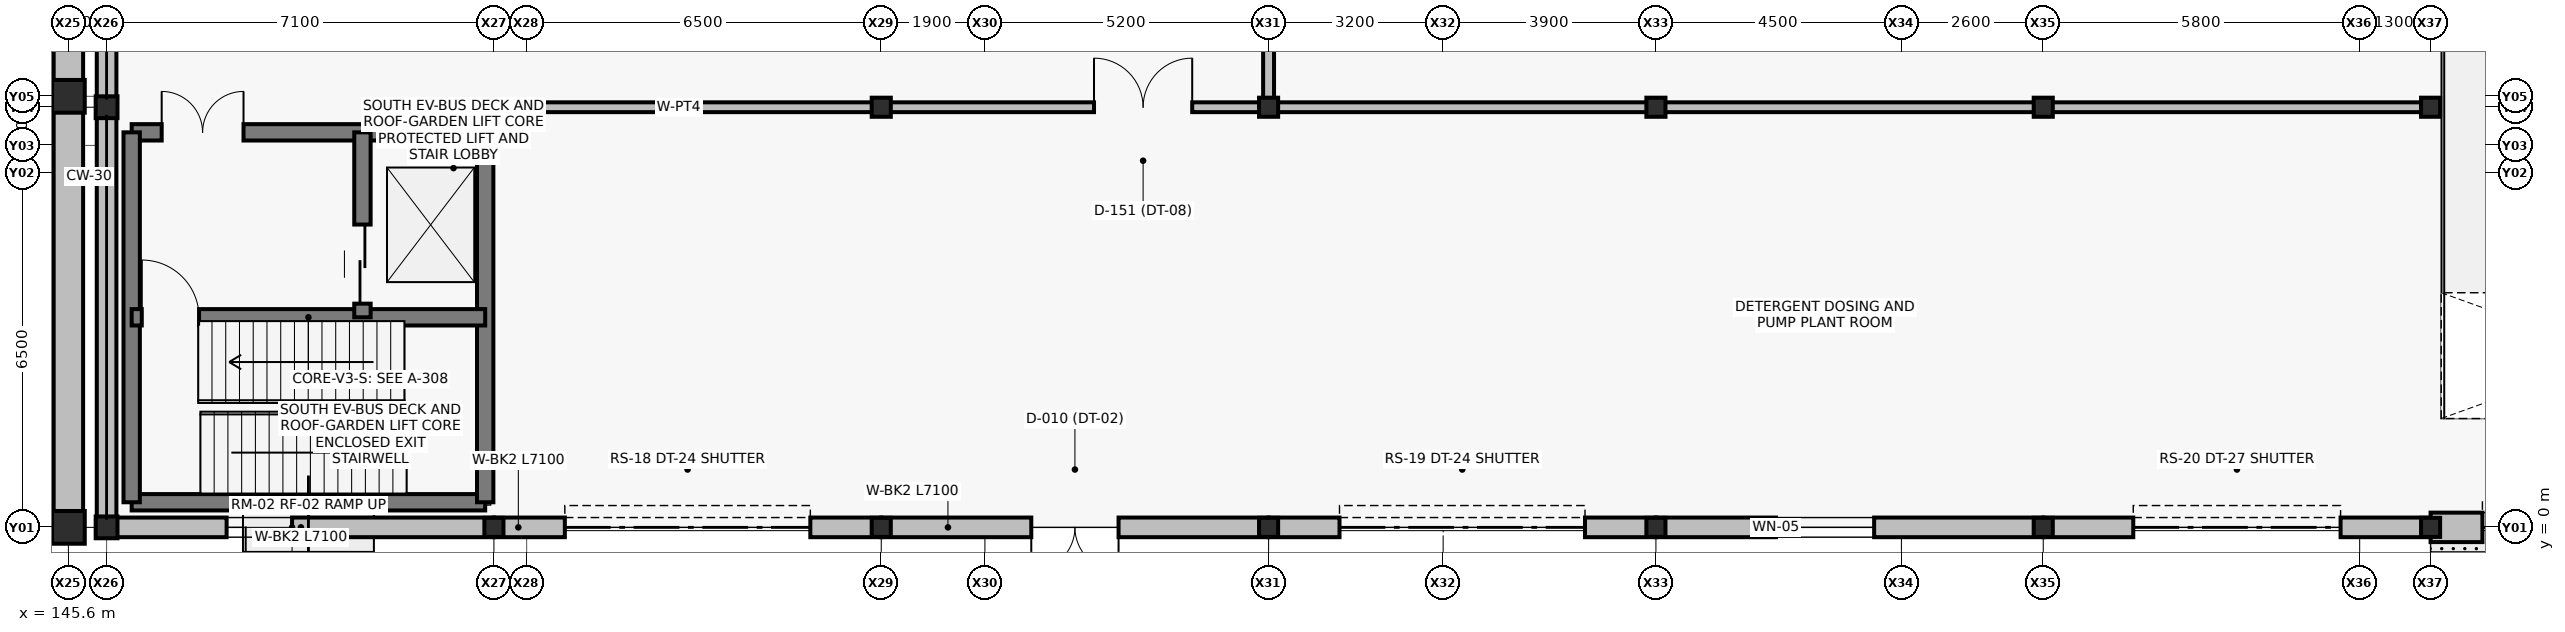
"""IFC4 building model, lengths in metres.
Left out: names, types, materials, properties, quantities, classifications, styles, units other than length and angle.
Written with IfcOpenShell. Run it as: python <this file> out.ifc"""

import sys

from ifc_helpers import new_model, si_unit, direction, frame, frame_2d, origin, origin_2d, place, context, subcontext, project, spatial, rectangle, hollow_rectangle, i_section, extrude, element, fill, save


model = new_model("IFC4")
c1 = context("Model", 3, precision=1e-05, world=origin(), true_north=direction((0.0, 1.0)))
c2 = subcontext(c1, "Body", "Model", "MODEL_VIEW")
j1 = project(units=[si_unit("LENGTHUNIT", "METRE"), si_unit("PLANEANGLEUNIT", "RADIAN")], contexts=[c1])
p1 = place(None, origin())
s1 = spatial("IfcSite", under=j1, at=p1, CompositionType="ELEMENT")
p2 = place(p1, origin())
s2 = spatial("IfcBuilding", under=s1, at=p2, CompositionType="ELEMENT")
p3 = place(p2, origin())
s3 = spatial("IfcBuildingStorey", under=s2, at=p3, CompositionType="ELEMENT", Elevation=0.0)
p4 = place(p3, frame((146.3, 0.0, -0.35), z_axis=(0.0, 0.0, 1.0), x_axis=(1.0, 0.0, 0.0)))
e1 = element("IfcColumn", 1, at=p4, inside=s3, PredefinedType="COLUMN", context=c2, shape_type="SweptSolid", body=[
    extrude(hollow_rectangle(XDim=0.4, YDim=0.4, WallThickness=0.016, at=origin_2d()), origin(), (0.0, 0.0, 1.0), 6.35),
])
p5 = place(p3, frame((146.3, 7.7, -0.35), z_axis=(0.0, 0.0, 1.0), x_axis=(1.0, 0.0, 0.0)))
e2 = element("IfcColumn", 2, at=p5, inside=s3, PredefinedType="COLUMN", context=c2, shape_type="SweptSolid", body=[
    extrude(i_section(OverallWidth=0.4, OverallDepth=0.4, WebThickness=0.013, FlangeThickness=0.021, at=origin_2d()), origin(), (0.0, 0.0, 1.0), 6.35),
])
for number, where, z_axis, x_axis in (
    (3, (153.4, 0.0, -0.35), (0.0, 0.0, 1.0), (1.0, 0.0, 0.0)),
    (4, (160.5, 0.0, -0.35), (0.0, 0.0, 1.0), (1.0, 0.0, 0.0)),
    (5, (160.5, 7.7, -0.35), (0.0, 0.0, 1.0), (1.0, 0.0, 0.0)),
    (6, (167.6, 0.0, -0.35), (0.0, 0.0, 1.0), (1.0, 0.0, 0.0)),
    (7, (167.6, 7.7, -0.35), (0.0, 0.0, 1.0), (1.0, 0.0, 0.0)),
    (8, (174.7, 0.0, -0.35), (0.0, 0.0, 1.0), (1.0, 0.0, 0.0)),
    (9, (174.7, 7.7, -0.35), (0.0, 0.0, 1.0), (1.0, 0.0, 0.0)),
    (10, (181.8, 0.0, -0.35), (0.0, 0.0, 1.0), (1.0, 0.0, 0.0)),
    (11, (181.8, 7.7, -0.35), (0.0, 0.0, 1.0), (1.0, 0.0, 0.0)),
    (12, (188.9, 0.0, -0.35), (0.0, 0.0, 1.0), (1.0, 0.0, 0.0)),
    (13, (188.9, 7.7, -0.35), (0.0, 0.0, 1.0), (1.0, 0.0, 0.0)),
):
    element("IfcColumn", number, at=place(p3, frame(where, z_axis=z_axis, x_axis=x_axis)), inside=s3, PredefinedType="COLUMN", context=c2, shape_type="SweptSolid", body=[
        extrude(i_section(OverallWidth=0.35, OverallDepth=0.35, WebThickness=0.012, FlangeThickness=0.019, at=origin_2d()), origin(), (0.0, 0.0, 1.0), 6.35),
    ])
for number, where, z_axis, x_axis in (
    (14, (145.6, 0.0, -0.35), (0.0, 0.0, 1.0), (1.0, 0.0, 0.0)),
    (15, (145.6, 7.9, -0.35), (0.0, 0.0, 1.0), (1.0, 0.0, 0.0)),
):
    element("IfcColumn", number, at=place(p3, frame(where, z_axis=z_axis, x_axis=x_axis)), inside=s3, PredefinedType="COLUMN", context=c2, shape_type="SweptSolid", body=[
        extrude(rectangle(XDim=0.6, YDim=0.6, at=origin_2d()), origin(), (0.0, 0.0, 1.0), 6.35),
    ])
p6 = place(p3, frame((188.9, 0.0, 0.0), z_axis=(0.0, 0.0, 1.0), x_axis=(1.0, 0.0, 0.0)))
e16 = element("IfcWall", 16, at=p6, inside=s3, PredefinedType="SOLIDWALL", context=c2, shape_type="SweptSolid", body=[
    extrude(rectangle(XDim=7.1, YDim=0.54, at=frame_2d((3.55, 0.0))), origin(), (0.0, 0.0, 1.0), 4.82),
])
p7 = place(p6, frame((0.95, 0.0, 0.0)))
e17 = element("IfcOpeningElement", 17, at=p7, cuts=e16, PredefinedType="OPENING", context=c2, shape_type="SweptSolid", body=[
    extrude(rectangle(XDim=5.2, YDim=4.45, at=frame_2d((2.6, 2.225))), frame((0.0, 0.28, 0.0), z_axis=(0.0, -1.0, 0.0), x_axis=(1.0, 0.0, 0.0)), (0.0, 0.0, 1.0), 0.56),
])
p8 = place(p3, frame((146.3, 0.0, 0.0), z_axis=(0.0, 0.0, 1.0), x_axis=(1.0, 0.0, 0.0)))
e18 = element("IfcWall", 18, at=p8, inside=s3, PredefinedType="SOLIDWALL", context=c2, shape_type="SweptSolid", body=[
    extrude(rectangle(XDim=7.1, YDim=0.36, at=frame_2d((3.55, 0.0))), origin(), (0.0, 0.0, 1.0), 4.82),
])
p9 = place(p8, frame((2.2, 0.0, 1.0)))
e19 = element("IfcOpeningElement", 19, at=p9, cuts=e18, PredefinedType="OPENING", context=c2, shape_type="SweptSolid", body=[
    extrude(rectangle(XDim=1.2, YDim=1.5, at=frame_2d((0.6, 0.75))), frame((0.0, 0.19, 0.0), z_axis=(0.0, -1.0, 0.0), x_axis=(1.0, 0.0, 0.0)), (0.0, 0.0, 1.0), 0.38),
])
p10 = place(p3, frame((153.4, 0.0, 0.0), z_axis=(0.0, 0.0, 1.0), x_axis=(1.0, 0.0, 0.0)))
e20 = element("IfcWall", 20, at=p10, inside=s3, PredefinedType="SOLIDWALL", context=c2, shape_type="SweptSolid", body=[
    extrude(rectangle(XDim=7.1, YDim=0.36, at=frame_2d((3.55, 0.0))), origin(), (0.0, 0.0, 1.0), 4.82),
])
p11 = place(p10, frame((1.3, 0.0, 0.0)))
e21 = element("IfcOpeningElement", 21, at=p11, cuts=e20, PredefinedType="OPENING", context=c2, shape_type="SweptSolid", body=[
    extrude(rectangle(XDim=4.5, YDim=4.45, at=frame_2d((2.25, 2.225))), frame((0.0, 0.19, 0.0), z_axis=(0.0, -1.0, 0.0), x_axis=(1.0, 0.0, 0.0)), (0.0, 0.0, 1.0), 0.38),
])
p12 = place(p3, frame((160.5, 0.0, 0.0), z_axis=(0.0, 0.0, 1.0), x_axis=(1.0, 0.0, 0.0)))
e22 = element("IfcWall", 22, at=p12, inside=s3, PredefinedType="SOLIDWALL", context=c2, shape_type="SweptSolid", body=[
    extrude(rectangle(XDim=7.1, YDim=0.36, at=frame_2d((3.55, 0.0))), origin(), (0.0, 0.0, 1.0), 4.82),
])
p13 = place(p12, frame((2.75, 0.0, 0.0)))
e23 = element("IfcOpeningElement", 23, at=p13, cuts=e22, PredefinedType="OPENING", context=c2, shape_type="SweptSolid", body=[
    extrude(rectangle(XDim=1.6, YDim=2.3, at=frame_2d((0.8, 1.15))), frame((0.0, 0.19, 0.0), z_axis=(0.0, -1.0, 0.0), x_axis=(1.0, 0.0, 0.0)), (0.0, 0.0, 1.0), 0.38),
])
p14 = place(p3, frame((167.6, 0.0, 0.0), z_axis=(0.0, 0.0, 1.0), x_axis=(1.0, 0.0, 0.0)))
e24 = element("IfcWall", 24, at=p14, inside=s3, PredefinedType="SOLIDWALL", context=c2, shape_type="SweptSolid", body=[
    extrude(rectangle(XDim=7.1, YDim=0.36, at=frame_2d((3.55, 0.0))), origin(), (0.0, 0.0, 1.0), 4.82),
])
p15 = place(p14, frame((1.3, 0.0, 0.0)))
e25 = element("IfcOpeningElement", 25, at=p15, cuts=e24, PredefinedType="OPENING", context=c2, shape_type="SweptSolid", body=[
    extrude(rectangle(XDim=4.5, YDim=4.45, at=frame_2d((2.25, 2.225))), frame((0.0, 0.19, 0.0), z_axis=(0.0, -1.0, 0.0), x_axis=(1.0, 0.0, 0.0)), (0.0, 0.0, 1.0), 0.38),
])
p16 = place(p3, frame((174.7, 0.0, 0.0), z_axis=(0.0, 0.0, 1.0), x_axis=(1.0, 0.0, 0.0)))
e26 = element("IfcWall", 26, at=p16, inside=s3, PredefinedType="SOLIDWALL", context=c2, shape_type="SweptSolid", body=[
    extrude(rectangle(XDim=7.1, YDim=0.36, at=frame_2d((3.55, 0.0))), origin(), (0.0, 0.0, 1.0), 4.82),
])
p17 = place(p16, frame((2.2, 0.0, 1.0)))
e27 = element("IfcOpeningElement", 27, at=p17, cuts=e26, PredefinedType="OPENING", context=c2, shape_type="SweptSolid", body=[
    extrude(rectangle(XDim=1.8, YDim=1.8, at=frame_2d((0.9, 0.9))), frame((0.0, 0.19, 0.0), z_axis=(0.0, -1.0, 0.0), x_axis=(1.0, 0.0, 0.0)), (0.0, 0.0, 1.0), 0.38),
])
p18 = place(p3, frame((181.8, 0.0, 0.0), z_axis=(0.0, 0.0, 1.0), x_axis=(1.0, 0.0, 0.0)))
e28 = element("IfcWall", 28, at=p18, inside=s3, PredefinedType="SOLIDWALL", context=c2, shape_type="SweptSolid", body=[
    extrude(rectangle(XDim=7.1, YDim=0.36, at=frame_2d((3.55, 0.0))), origin(), (0.0, 0.0, 1.0), 4.82),
])
p19 = place(p18, frame((1.65, 0.0, 0.0)))
e29 = element("IfcOpeningElement", 29, at=p19, cuts=e28, PredefinedType="OPENING", context=c2, shape_type="SweptSolid", body=[
    extrude(rectangle(XDim=3.8, YDim=4.4, at=frame_2d((1.9, 2.2))), frame((0.0, 0.19, 0.0), z_axis=(0.0, -1.0, 0.0), x_axis=(1.0, 0.0, 0.0)), (0.0, 0.0, 1.0), 0.38),
])
p20 = place(p3, frame((138.6, 0.0, 0.0), z_axis=(0.0, 0.0, 1.0), x_axis=(1.0, 0.0, 0.0)))
e30 = element("IfcWall", 30, at=p20, inside=s3, PredefinedType="SOLIDWALL", context=c2, shape_type="SweptSolid", body=[
    extrude(rectangle(XDim=7.0, YDim=0.54, at=frame_2d((3.5, 0.0))), origin(), (0.0, 0.0, 1.0), 5.25),
])
p21 = place(p20, frame((1.6, 0.0, 0.0)))
e31 = element("IfcOpeningElement", 31, at=p21, cuts=e30, PredefinedType="OPENING", context=c2, shape_type="SweptSolid", body=[
    extrude(rectangle(XDim=3.8, YDim=4.4, at=frame_2d((1.9, 2.2))), frame((0.0, 0.28, 0.0), z_axis=(0.0, -1.0, 0.0), x_axis=(1.0, 0.0, 0.0)), (0.0, 0.0, 1.0), 0.56),
])
for number, where, z_axis, x_axis in (
    (32, (145.6, 0.0, 0.0), (0.0, 0.0, 1.0), (0.0, 1.0, 0.0)),
    (33, (145.6, 7.9, 0.0), (0.0, 0.0, 1.0), (0.0, 1.0, 0.0)),
):
    element("IfcWall", number, at=place(p3, frame(where, z_axis=z_axis, x_axis=x_axis)), inside=s3, PredefinedType="SOLIDWALL", context=c2, shape_type="SweptSolid", body=[
        extrude(rectangle(XDim=7.9, YDim=0.54, at=frame_2d((3.95, 0.0))), origin(), (0.0, 0.0, 1.0), 5.25),
    ])
for number, where, z_axis, x_axis in (
    (34, (146.3, 0.0, 0.0), (0.0, 0.0, 1.0), (0.0, 1.0, 0.0)),
    (35, (146.3, 7.7, 0.0), (0.0, 0.0, 1.0), (0.0, 1.0, 0.0)),
):
    element("IfcWall", number, at=place(p3, frame(where, z_axis=z_axis, x_axis=x_axis)), inside=s3, PredefinedType="SOLIDWALL", context=c2, shape_type="SweptSolid", body=[
        extrude(rectangle(XDim=7.7, YDim=0.36, at=frame_2d((3.85, 0.0))), origin(), (0.0, 0.0, 1.0), 2.2),
    ])
p22 = place(p3, frame((146.76, 0.46, -0.35), z_axis=(0.0, 0.0, 1.0), x_axis=(1.0, 0.0, 0.0)))
e36 = element("IfcWall", 36, at=p22, inside=s3, PredefinedType="SHEAR", context=c2, shape_type="SweptSolid", body=[
    extrude(rectangle(XDim=6.48, YDim=0.3, at=frame_2d((3.24, 0.0))), origin(), (0.0, 0.0, 1.0), 6.07),
])
p23 = place(p3, frame((146.76, 7.24, -0.35), z_axis=(0.0, 0.0, 1.0), x_axis=(1.0, 0.0, 0.0)))
e37 = element("IfcWall", 37, at=p23, inside=s3, PredefinedType="SHEAR", context=c2, shape_type="SweptSolid", body=[
    extrude(rectangle(XDim=6.48, YDim=0.3, at=frame_2d((3.24, 0.0))), origin(), (0.0, 0.0, 1.0), 6.07),
])
p24 = place(p23, frame((0.55, 0.0, 0.35)))
e38 = element("IfcOpeningElement", 38, at=p24, cuts=e37, PredefinedType="OPENING", context=c2, shape_type="SweptSolid", body=[
    extrude(rectangle(XDim=1.5, YDim=2.2, at=frame_2d((0.75, 1.1))), frame((0.0, 0.16, 0.0), z_axis=(0.0, -1.0, 0.0), x_axis=(1.0, 0.0, 0.0)), (0.0, 0.0, 1.0), 0.32),
])
for number, where, z_axis, x_axis in (
    (39, (146.76, 0.46, -0.35), (0.0, 0.0, 1.0), (0.0, 1.0, 0.0)),
    (40, (153.24, 0.46, -0.35), (0.0, 0.0, 1.0), (0.0, 1.0, 0.0)),
):
    element("IfcWall", number, at=place(p3, frame(where, z_axis=z_axis, x_axis=x_axis)), inside=s3, PredefinedType="SHEAR", context=c2, shape_type="SweptSolid", body=[
        extrude(rectangle(XDim=6.78, YDim=0.3, at=frame_2d((3.39, 0.0))), origin(), (0.0, 0.0, 1.0), 6.07),
    ])
p25 = place(p3, frame((146.76, 3.85, -0.35), z_axis=(0.0, 0.0, 1.0), x_axis=(1.0, 0.0, 0.0)))
e41 = element("IfcWall", 41, at=p25, inside=s3, PredefinedType="SHEAR", context=c2, shape_type="SweptSolid", body=[
    extrude(rectangle(XDim=6.48, YDim=0.3, at=frame_2d((3.24, 0.0))), origin(), (0.0, 0.0, 1.0), 6.07),
])
p26 = place(p25, frame((0.185, 0.0, 0.35)))
e42 = element("IfcOpeningElement", 42, at=p26, cuts=e41, PredefinedType="OPENING", context=c2, shape_type="SweptSolid", body=[
    extrude(rectangle(XDim=1.05, YDim=2.15, at=frame_2d((0.525, 1.075))), frame((0.0, 0.16, 0.0), z_axis=(0.0, -1.0, 0.0), x_axis=(1.0, 0.0, 0.0)), (0.0, 0.0, 1.0), 0.32),
])
p27 = place(p3, frame((150.99, 3.85, -0.35), z_axis=(0.0, 0.0, 1.0), x_axis=(0.0, 1.0, 0.0)))
e43 = element("IfcWall", 43, at=p27, inside=s3, PredefinedType="SHEAR", context=c2, shape_type="SweptSolid", body=[
    extrude(rectangle(XDim=3.39, YDim=0.3, at=frame_2d((1.695, 0.0))), origin(), (0.0, 0.0, 1.0), 6.07),
])
p28 = place(p27, frame((0.25, 0.0, 0.35)))
e44 = element("IfcOpeningElement", 44, at=p28, cuts=e43, PredefinedType="OPENING", context=c2, shape_type="SweptSolid", body=[
    extrude(rectangle(XDim=1.45, YDim=2.25, at=frame_2d((0.725, 1.125))), frame((0.0, 0.16, 0.0), z_axis=(0.0, -1.0, 0.0), x_axis=(1.0, 0.0, 0.0)), (0.0, 0.0, 1.0), 0.32),
])
p29 = place(p3, frame((167.6, 7.7, 0.0), z_axis=(0.0, 0.0, 1.0), x_axis=(0.0, 1.0, 0.0)))
e45 = element("IfcWall", 45, at=p29, inside=s3, PredefinedType="PARTITIONING", context=c2, shape_type="SweptSolid", body=[
    extrude(rectangle(XDim=53.9, YDim=0.2, at=frame_2d((26.95, 0.0))), origin(), (0.0, 0.0, 1.0), 4.85),
])
p30 = place(p29, frame((18.0, 0.0, 0.0)))
e46 = element("IfcOpeningElement", 46, at=p30, cuts=e45, PredefinedType="OPENING", context=c2, shape_type="SweptSolid", body=[
    extrude(rectangle(XDim=1.6, YDim=2.2, at=frame_2d((0.8, 1.1))), frame((0.0, 0.11, 0.0), z_axis=(0.0, -1.0, 0.0), x_axis=(1.0, 0.0, 0.0)), (0.0, 0.0, 1.0), 0.22),
])
p31 = place(p29, frame((36.0, 0.0, 0.0)))
e47 = element("IfcOpeningElement", 47, at=p31, cuts=e45, PredefinedType="OPENING", context=c2, shape_type="SweptSolid", body=[
    extrude(rectangle(XDim=1.6, YDim=2.2, at=frame_2d((0.8, 1.1))), frame((0.0, 0.11, 0.0), z_axis=(0.0, -1.0, 0.0), x_axis=(1.0, 0.0, 0.0)), (0.0, 0.0, 1.0), 0.22),
])
p32 = place(p3, frame((153.4, 7.7, 0.0), z_axis=(0.0, 0.0, 1.0), x_axis=(1.0, 0.0, 0.0)))
e48 = element("IfcWall", 48, at=p32, inside=s3, PredefinedType="PARTITIONING", context=c2, shape_type="SweptSolid", body=[
    extrude(rectangle(XDim=35.5, YDim=0.18, at=frame_2d((17.75, 0.0))), origin(), (0.0, 0.0, 1.0), 4.85),
])
p33 = place(p32, frame((11.0, 0.0, 0.0)))
e49 = element("IfcOpeningElement", 49, at=p33, cuts=e48, PredefinedType="OPENING", context=c2, shape_type="SweptSolid", body=[
    extrude(rectangle(XDim=1.8, YDim=2.3, at=frame_2d((0.9, 1.15))), frame((0.0, 0.1, 0.0), z_axis=(0.0, -1.0, 0.0), x_axis=(1.0, 0.0, 0.0)), (0.0, 0.0, 1.0), 0.2),
])
p34 = place(p7, frame((5.2, 0.0, 0.0), z_axis=(0.0, 0.0, 1.0), x_axis=(-1.0, 0.0, 0.0)))
e50 = element("IfcDoor", 50, at=p34, inside=s3, OperationType="ROLLINGUP", PredefinedType="DOOR", context=c2, shape_type="SweptSolid", body=[
    extrude(rectangle(XDim=5.2, YDim=4.45, at=frame_2d((2.6, 2.225))), frame((0.0, 0.025, 0.0), z_axis=(0.0, -1.0, 0.0), x_axis=(1.0, 0.0, 0.0)), (0.0, 0.0, 1.0), 0.05),
])
fill(e17, e50)
p35 = place(p9, origin())
e51 = element("IfcWindow", 51, at=p35, inside=s3, PartitioningType="SINGLE_PANEL", PredefinedType="WINDOW", context=c2, shape_type="SweptSolid", body=[
    extrude(rectangle(XDim=1.2, YDim=1.5, at=frame_2d((0.6, 0.75))), frame((0.0, 0.03, 0.0), z_axis=(0.0, -1.0, 0.0), x_axis=(1.0, 0.0, 0.0)), (0.0, 0.0, 1.0), 0.06),
])
fill(e19, e51)
p36 = place(p11, frame((4.5, 0.0, 0.0), z_axis=(0.0, 0.0, 1.0), x_axis=(-1.0, 0.0, 0.0)))
e52 = element("IfcDoor", 52, at=p36, inside=s3, OperationType="ROLLINGUP", PredefinedType="DOOR", context=c2, shape_type="SweptSolid", body=[
    extrude(rectangle(XDim=4.5, YDim=4.45, at=frame_2d((2.25, 2.225))), frame((0.0, 0.025, 0.0), z_axis=(0.0, -1.0, 0.0), x_axis=(1.0, 0.0, 0.0)), (0.0, 0.0, 1.0), 0.05),
])
fill(e21, e52)
p37 = place(p13, frame((1.6, 0.0, 0.0), z_axis=(0.0, 0.0, 1.0), x_axis=(-1.0, 0.0, 0.0)))
e53 = element("IfcDoor", 53, at=p37, inside=s3, OperationType="DOUBLE_DOOR_SINGLE_SWING", PredefinedType="DOOR", context=c2, shape_type="SweptSolid", body=[
    extrude(rectangle(XDim=1.6, YDim=2.3, at=frame_2d((0.8, 1.15))), frame((0.0, 0.025, 0.0), z_axis=(0.0, -1.0, 0.0), x_axis=(1.0, 0.0, 0.0)), (0.0, 0.0, 1.0), 0.05),
])
fill(e23, e53)
p38 = place(p15, frame((4.5, 0.0, 0.0), z_axis=(0.0, 0.0, 1.0), x_axis=(-1.0, 0.0, 0.0)))
e54 = element("IfcDoor", 54, at=p38, inside=s3, OperationType="ROLLINGUP", PredefinedType="DOOR", context=c2, shape_type="SweptSolid", body=[
    extrude(rectangle(XDim=4.5, YDim=4.45, at=frame_2d((2.25, 2.225))), frame((0.0, 0.025, 0.0), z_axis=(0.0, -1.0, 0.0), x_axis=(1.0, 0.0, 0.0)), (0.0, 0.0, 1.0), 0.05),
])
fill(e25, e54)
p39 = place(p17, origin())
e55 = element("IfcWindow", 55, at=p39, inside=s3, PartitioningType="SINGLE_PANEL", PredefinedType="WINDOW", context=c2, shape_type="SweptSolid", body=[
    extrude(rectangle(XDim=1.8, YDim=1.8, at=frame_2d((0.9, 0.9))), frame((0.0, 0.03, 0.0), z_axis=(0.0, -1.0, 0.0), x_axis=(1.0, 0.0, 0.0)), (0.0, 0.0, 1.0), 0.06),
])
fill(e27, e55)
p40 = place(p19, frame((3.8, 0.0, 0.0), z_axis=(0.0, 0.0, 1.0), x_axis=(-1.0, 0.0, 0.0)))
e56 = element("IfcDoor", 56, at=p40, inside=s3, OperationType="ROLLINGUP", PredefinedType="DOOR", context=c2, shape_type="SweptSolid", body=[
    extrude(rectangle(XDim=3.8, YDim=4.4, at=frame_2d((1.9, 2.2))), frame((0.0, 0.025, 0.0), z_axis=(0.0, -1.0, 0.0), x_axis=(1.0, 0.0, 0.0)), (0.0, 0.0, 1.0), 0.05),
])
fill(e29, e56)
p41 = place(p26, origin())
e57 = element("IfcDoor", 57, at=p41, inside=s3, OperationType="SINGLE_SWING_LEFT", PredefinedType="DOOR", context=c2, shape_type="SweptSolid", body=[
    extrude(rectangle(XDim=1.05, YDim=2.15, at=frame_2d((0.525, 1.075))), frame((0.0, 0.025, 0.0), z_axis=(0.0, -1.0, 0.0), x_axis=(1.0, 0.0, 0.0)), (0.0, 0.0, 1.0), 0.05),
])
fill(e42, e57)
p42 = place(p24, origin())
e58 = element("IfcDoor", 58, at=p42, inside=s3, OperationType="DOUBLE_DOOR_SINGLE_SWING", PredefinedType="DOOR", context=c2, shape_type="SweptSolid", body=[
    extrude(rectangle(XDim=1.5, YDim=2.2, at=frame_2d((0.75, 1.1))), frame((0.0, 0.025, 0.0), z_axis=(0.0, -1.0, 0.0), x_axis=(1.0, 0.0, 0.0)), (0.0, 0.0, 1.0), 0.05),
])
fill(e38, e58)
p43 = place(p28, origin())
e59 = element("IfcDoor", 59, at=p43, inside=s3, OperationType="SLIDING_TO_RIGHT", PredefinedType="DOOR", context=c2, shape_type="SweptSolid", body=[
    extrude(rectangle(XDim=1.45, YDim=2.25, at=frame_2d((0.725, 1.125))), frame((0.0, 0.025, 0.0), z_axis=(0.0, -1.0, 0.0), x_axis=(1.0, 0.0, 0.0)), (0.0, 0.0, 1.0), 0.05),
])
fill(e44, e59)
p44 = place(p33, origin())
e60 = element("IfcDoor", 60, at=p44, inside=s3, OperationType="DOUBLE_DOOR_SINGLE_SWING", PredefinedType="DOOR", context=c2, shape_type="SweptSolid", body=[
    extrude(rectangle(XDim=1.8, YDim=2.3, at=frame_2d((0.9, 1.15))), frame((0.0, 0.025, 0.0), z_axis=(0.0, -1.0, 0.0), x_axis=(1.0, 0.0, 0.0)), (0.0, 0.0, 1.0), 0.05),
])
fill(e49, e60)
save(model, sys.argv[1])
